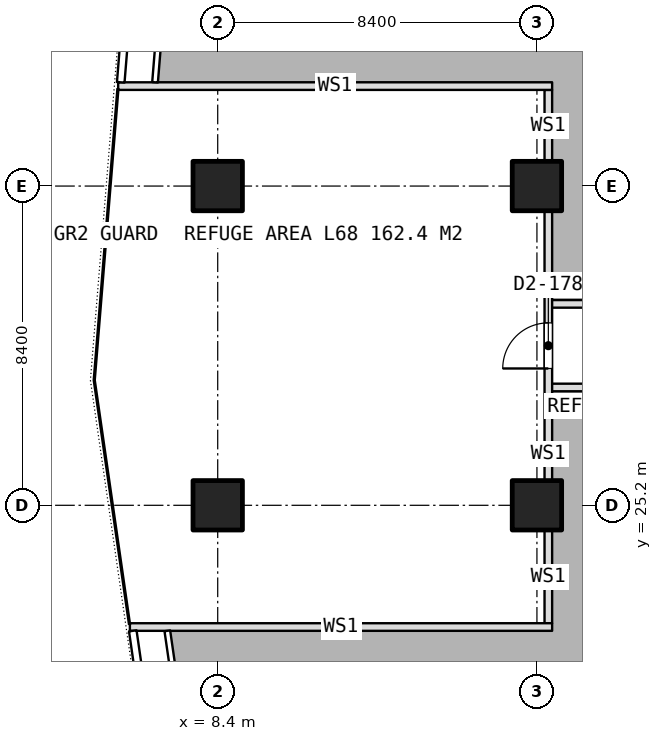
"""IFC4 building model, lengths in metres.
Left out: names, types, materials, properties, quantities, classifications, styles, units other than length and angle.
Written with IfcOpenShell. Run it as: python <this file> out.ifc"""

import sys

from ifc_helpers import new_model, si_unit, direction, frame, frame_2d, origin, origin_2d, place, context, subcontext, project, spatial, rectangle, extrude, element, fill, save


model = new_model("IFC4")
c1 = context("Model", 3, precision=1e-05, world=origin(), true_north=direction((0.0, 1.0)))
c2 = subcontext(c1, "Body", "Model", "MODEL_VIEW")
j1 = project(units=[si_unit("LENGTHUNIT", "METRE"), si_unit("PLANEANGLEUNIT", "RADIAN")], contexts=[c1])
p1 = place(None, origin())
s1 = spatial("IfcSite", under=j1, at=p1, CompositionType="ELEMENT")
p2 = place(p1, origin())
s2 = spatial("IfcBuilding", under=s1, at=p2, CompositionType="ELEMENT")
p3 = place(p2, frame((0.0, 0.0, 268.85)))
s3 = spatial("IfcBuildingStorey", under=s2, at=p3, CompositionType="ELEMENT", Elevation=268.85)
for number, where, z_axis, x_axis in (
    (1, (8.4, 25.2, 0.0), (0.0, 0.0, 1.0), (1.0, 0.0, 0.0)),
    (2, (8.4, 33.6, 0.0), (0.0, 0.0, 1.0), (1.0, 0.0, 0.0)),
    (3, (16.8, 25.2, 0.0), (0.0, 0.0, 1.0), (1.0, 0.0, 0.0)),
    (4, (16.8, 33.6, 0.0), (0.0, 0.0, 1.0), (1.0, 0.0, 0.0)),
):
    element("IfcColumn", number, at=place(p3, frame(where, z_axis=z_axis, x_axis=x_axis)), inside=s3, PredefinedType="COLUMN", context=c2, shape_type="SweptSolid", body=[
        extrude(rectangle(XDim=1.3, YDim=1.3, at=origin_2d()), origin(), (0.0, 0.0, 1.0), 3.75),
    ])
p4 = place(p3, frame((17.1, 22.097, 0.0), z_axis=(0.0, 0.0, 1.0), x_axis=(0.0, 1.0, 0.0)))
e5 = element("IfcWall", 5, at=p4, inside=s3, PredefinedType="PARTITIONING", context=c2, shape_type="SweptSolid", body=[
    extrude(rectangle(XDim=2.453, YDim=0.2, at=frame_2d((1.227, 0.0))), origin(), (0.0, 0.0, 1.0), 3.5),
])
p5 = place(p3, frame((17.1, 25.85, 0.0), z_axis=(0.0, 0.0, 1.0), x_axis=(0.0, 1.0, 0.0)))
e6 = element("IfcWall", 6, at=p5, inside=s3, PredefinedType="PARTITIONING", context=c2, shape_type="SweptSolid", body=[
    extrude(rectangle(XDim=7.1, YDim=0.2, at=frame_2d((3.55, 0.0))), origin(), (0.0, 0.0, 1.0), 3.5),
])
p6 = place(p5, frame((2.95, 0.0, 0.0)))
e7 = element("IfcOpeningElement", 7, at=p6, cuts=e6, PredefinedType="OPENING", context=c2, shape_type="SweptSolid", body=[
    extrude(rectangle(XDim=1.2, YDim=2.1, at=frame_2d((0.6, 1.05))), frame((0.0, 0.11, 0.0), z_axis=(0.0, -1.0, 0.0), x_axis=(1.0, 0.0, 0.0)), (0.0, 0.0, 1.0), 0.22),
])
p7 = place(p3, frame((17.1, 34.25, 0.0), z_axis=(0.0, 0.0, 1.0), x_axis=(0.0, 1.0, 0.0)))
e8 = element("IfcWall", 8, at=p7, inside=s3, PredefinedType="PARTITIONING", context=c2, shape_type="SweptSolid", body=[
    extrude(rectangle(XDim=1.88, YDim=0.2, at=frame_2d((0.94, 0.0))), origin(), (0.0, 0.0, 1.0), 3.5),
])
p8 = place(p3, frame((6.089, 21.997, 0.0), z_axis=(0.0, 0.0, 1.0), x_axis=(1.0, 0.0, 0.0)))
e9 = element("IfcWall", 9, at=p8, inside=s3, PredefinedType="PARTITIONING", context=c2, shape_type="SweptSolid", body=[
    extrude(rectangle(XDim=11.111, YDim=0.2, at=frame_2d((5.555, 0.0))), origin(), (0.0, 0.0, 1.0), 3.5),
])
p9 = place(p3, frame((5.78, 36.23, 0.0), z_axis=(0.0, 0.0, 1.0), x_axis=(1.0, 0.0, 0.0)))
e10 = element("IfcWall", 10, at=p9, inside=s3, PredefinedType="PARTITIONING", context=c2, shape_type="SweptSolid", body=[
    extrude(rectangle(XDim=11.42, YDim=0.2, at=frame_2d((5.71, 0.0))), origin(), (0.0, 0.0, 1.0), 3.5),
])
p10 = place(p3, frame((17.1, 30.5, 0.0), z_axis=(0.0, 0.0, 1.0), x_axis=(1.0, 0.0, 0.0)))
e11 = element("IfcWall", 11, at=p10, inside=s3, PredefinedType="PARTITIONING", context=c2, shape_type="SweptSolid", body=[
    extrude(rectangle(XDim=8.1, YDim=0.2, at=frame_2d((4.05, 0.0))), origin(), (0.0, 0.0, 1.0), 3.5),
])
p11 = place(p10, frame((6.3, 0.0, 0.0)))
e12 = element("IfcOpeningElement", 12, at=p11, cuts=e11, PredefinedType="OPENING", context=c2, shape_type="SweptSolid", body=[
    extrude(rectangle(XDim=1.2, YDim=2.1, at=frame_2d((0.6, 1.05))), frame((0.0, 0.11, 0.0), z_axis=(0.0, -1.0, 0.0), x_axis=(1.0, 0.0, 0.0)), (0.0, 0.0, 1.0), 0.22),
])
p12 = place(p3, frame((17.1, 28.3, 0.0), z_axis=(0.0, 0.0, 1.0), x_axis=(1.0, 0.0, 0.0)))
e13 = element("IfcWall", 13, at=p12, inside=s3, PredefinedType="PARTITIONING", context=c2, shape_type="SweptSolid", body=[
    extrude(rectangle(XDim=8.1, YDim=0.2, at=frame_2d((4.05, 0.0))), origin(), (0.0, 0.0, 1.0), 3.5),
])
p13 = place(p6, origin())
e14 = element("IfcDoor", 14, at=p13, inside=s3, OperationType="SINGLE_SWING_LEFT", PredefinedType="DOOR", context=c2, shape_type="SweptSolid", body=[
    extrude(rectangle(XDim=1.2, YDim=2.1, at=frame_2d((0.6, 1.05))), frame((0.0, 0.025, 0.0), z_axis=(0.0, -1.0, 0.0), x_axis=(1.0, 0.0, 0.0)), (0.0, 0.0, 1.0), 0.05),
])
fill(e7, e14)
save(model, sys.argv[1])
